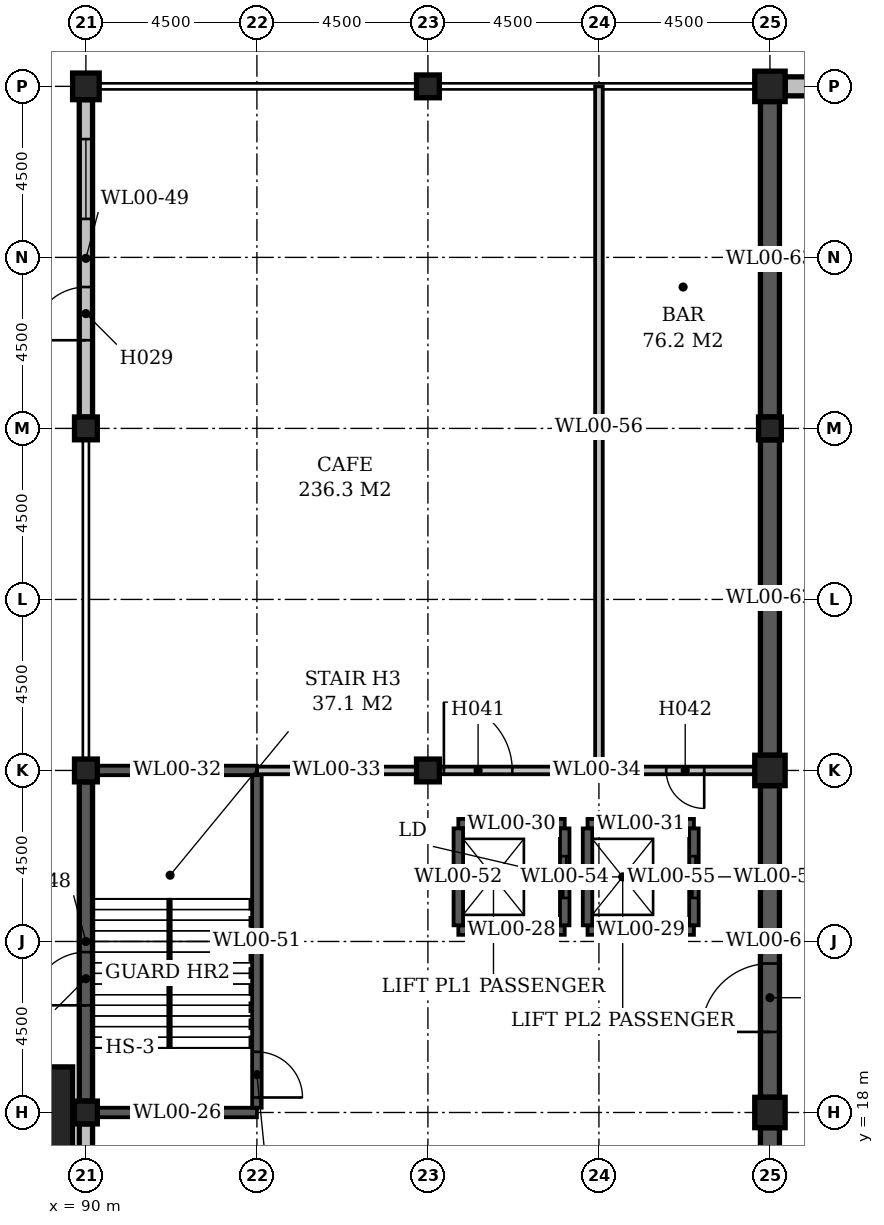
"""IFC4 building model, lengths in metres.
Left out: names, types, materials, properties, quantities, classifications, styles, units other than length and angle.
Written with IfcOpenShell. Run it as: python <this file> out.ifc"""

import sys

from ifc_helpers import new_model, si_unit, direction, frame, frame_2d, origin, origin_2d, place, context, subcontext, project, spatial, rectangle, extrude, element, fill, save


model = new_model("IFC4")
c1 = context("Model", 3, precision=1e-05, world=origin(), true_north=direction((0.0, 1.0)))
c2 = subcontext(c1, "Body", "Model", "MODEL_VIEW")
j1 = project(units=[si_unit("LENGTHUNIT", "METRE"), si_unit("PLANEANGLEUNIT", "RADIAN")], contexts=[c1])
p1 = place(None, origin())
s1 = spatial("IfcSite", under=j1, at=p1, CompositionType="ELEMENT")
p2 = place(p1, origin())
s2 = spatial("IfcBuilding", under=s1, at=p2, CompositionType="ELEMENT")
p3 = place(p2, origin())
s3 = spatial("IfcBuildingStorey", under=s2, at=p3, CompositionType="ELEMENT", Elevation=0.0)
for number, where, z_axis, x_axis in (
    (1, (90.0, 18.0, 0.0), (0.0, 0.0, 1.0), (1.0, 0.0, 0.0)),
    (2, (90.0, 27.0, 0.0), (0.0, 0.0, 1.0), (1.0, 0.0, 0.0)),
    (3, (90.0, 36.0, 0.0), (0.0, 0.0, 1.0), (1.0, 0.0, 0.0)),
):
    element("IfcColumn", number, at=place(p3, frame(where, z_axis=z_axis, x_axis=x_axis)), inside=s3, PredefinedType="COLUMN", context=c2, shape_type="SweptSolid", body=[
        extrude(rectangle(XDim=0.6, YDim=0.6, at=origin_2d()), origin(), (0.0, 0.0, 1.0), 8.7),
    ])
p4 = place(p3, frame((90.0, 45.0, 0.0), z_axis=(0.0, 0.0, 1.0), x_axis=(1.0, 0.0, 0.0)))
e4 = element("IfcColumn", 4, at=p4, inside=s3, PredefinedType="COLUMN", context=c2, shape_type="SweptSolid", body=[
    extrude(rectangle(XDim=0.7, YDim=0.7, at=origin_2d()), origin(), (0.0, 0.0, 1.0), 8.7),
])
for number, where, z_axis, x_axis in (
    (5, (99.0, 27.0, 0.0), (0.0, 0.0, 1.0), (1.0, 0.0, 0.0)),
    (6, (99.0, 45.0, 0.0), (0.0, 0.0, 1.0), (1.0, 0.0, 0.0)),
):
    element("IfcColumn", number, at=place(p3, frame(where, z_axis=z_axis, x_axis=x_axis)), inside=s3, PredefinedType="COLUMN", context=c2, shape_type="SweptSolid", body=[
        extrude(rectangle(XDim=0.6, YDim=0.6, at=origin_2d()), origin(), (0.0, 0.0, 1.0), 8.7),
    ])
for number, where, z_axis, x_axis in (
    (7, (108.0, 18.0, -0.3), (0.0, 0.0, 1.0), (1.0, 0.0, 0.0)),
    (8, (108.0, 27.0, -0.3), (0.0, 0.0, 1.0), (1.0, 0.0, 0.0)),
):
    element("IfcColumn", number, at=place(p3, frame(where, z_axis=z_axis, x_axis=x_axis)), inside=s3, PredefinedType="COLUMN", context=c2, shape_type="SweptSolid", body=[
        extrude(rectangle(XDim=0.8, YDim=0.8, at=origin_2d()), origin(), (0.0, 0.0, 1.0), 9.0),
    ])
p5 = place(p3, frame((108.0, 36.0, -0.3), z_axis=(0.0, 0.0, 1.0), x_axis=(1.0, 0.0, 0.0)))
e9 = element("IfcColumn", 9, at=p5, inside=s3, PredefinedType="COLUMN", context=c2, shape_type="SweptSolid", body=[
    extrude(rectangle(XDim=0.6, YDim=0.6, at=origin_2d()), origin(), (0.0, 0.0, 1.0), 9.0),
])
p6 = place(p3, frame((108.0, 45.0, -0.3), z_axis=(0.0, 0.0, 1.0), x_axis=(1.0, 0.0, 0.0)))
e10 = element("IfcColumn", 10, at=p6, inside=s3, PredefinedType="COLUMN", context=c2, shape_type="SweptSolid", body=[
    extrude(rectangle(XDim=0.8, YDim=0.8, at=origin_2d()), origin(), (0.0, 0.0, 1.0), 9.0),
])
p7 = place(p3, frame((90.3, 18.0, 0.0), z_axis=(0.0, 0.0, 1.0), x_axis=(1.0, 0.0, 0.0)))
e11 = element("IfcWall", 11, at=p7, inside=s3, PredefinedType="STANDARD", context=c2, shape_type="SweptSolid", body=[
    extrude(rectangle(XDim=4.2, YDim=0.25, at=frame_2d((2.1, 0.0))), origin(), (0.0, 0.0, 1.0), 9.0),
])
for number, where, z_axis, x_axis in (
    (12, (99.8, 22.8, 0.0), (0.0, 0.0, 1.0), (1.0, 0.0, 0.0)),
    (13, (103.2, 22.8, 0.0), (0.0, 0.0, 1.0), (1.0, 0.0, 0.0)),
    (14, (99.8, 25.6, 0.0), (0.0, 0.0, 1.0), (1.0, 0.0, 0.0)),
    (15, (103.2, 25.6, 0.0), (0.0, 0.0, 1.0), (1.0, 0.0, 0.0)),
):
    element("IfcWall", number, at=place(p3, frame(where, z_axis=z_axis, x_axis=x_axis)), inside=s3, PredefinedType="STANDARD", context=c2, shape_type="SweptSolid", body=[
        extrude(rectangle(XDim=2.8, YDim=0.25, at=frame_2d((1.4, 0.0))), origin(), (0.0, 0.0, 1.0), 9.0),
    ])
p8 = place(p3, frame((90.3, 27.0, 0.0), z_axis=(0.0, 0.0, 1.0), x_axis=(1.0, 0.0, 0.0)))
e16 = element("IfcWall", 16, at=p8, inside=s3, PredefinedType="STANDARD", context=c2, shape_type="SweptSolid", body=[
    extrude(rectangle(XDim=4.2, YDim=0.25, at=frame_2d((2.1, 0.0))), origin(), (0.0, 0.0, 1.0), 9.0),
])
p9 = place(p3, frame((94.5, 27.0, 0.0), z_axis=(0.0, 0.0, 1.0), x_axis=(1.0, 0.0, 0.0)))
e17 = element("IfcWall", 17, at=p9, inside=s3, PredefinedType="STANDARD", context=c2, shape_type="SweptSolid", body=[
    extrude(rectangle(XDim=4.2, YDim=0.2, at=frame_2d((2.1, 0.0))), origin(), (0.0, 0.0, 1.0), 8.7),
])
p10 = place(p3, frame((99.3, 27.0, 0.0), z_axis=(0.0, 0.0, 1.0), x_axis=(1.0, 0.0, 0.0)))
e18 = element("IfcWall", 18, at=p10, inside=s3, PredefinedType="STANDARD", context=c2, shape_type="SweptSolid", body=[
    extrude(rectangle(XDim=8.3, YDim=0.2, at=frame_2d((4.15, 0.0))), origin(), (0.0, 0.0, 1.0), 8.7),
])
p11 = place(p10, frame((0.12, 0.0, 0.0)))
e19 = element("IfcOpeningElement", 19, at=p11, cuts=e18, PredefinedType="OPENING", context=c2, shape_type="SweptSolid", body=[
    extrude(rectangle(XDim=1.8, YDim=2.4, at=frame_2d((0.9, 1.2))), frame((0.0, 0.112, 0.0), z_axis=(0.0, -1.0, 0.0), x_axis=(1.0, 0.0, 0.0)), (0.0, 0.0, 1.0), 0.224),
])
p12 = place(p10, frame((5.97, 0.0, 0.0)))
e20 = element("IfcOpeningElement", 20, at=p12, cuts=e18, PredefinedType="OPENING", context=c2, shape_type="SweptSolid", body=[
    extrude(rectangle(XDim=1.0, YDim=2.1, at=frame_2d((0.5, 1.05))), frame((0.0, 0.112, 0.0), z_axis=(0.0, -1.0, 0.0), x_axis=(1.0, 0.0, 0.0)), (0.0, 0.0, 1.0), 0.224),
])
p13 = place(p3, frame((108.4, 45.0, 0.0), z_axis=(0.0, 0.0, 1.0), x_axis=(1.0, 0.0, 0.0)))
e21 = element("IfcWall", 21, at=p13, inside=s3, PredefinedType="STANDARD", context=c2, shape_type="SweptSolid", body=[
    extrude(rectangle(XDim=8.3, YDim=0.5, at=frame_2d((4.15, 0.0))), origin(), (0.0, 0.0, 1.0), 9.0),
])
p14 = place(p3, frame((90.0, 9.3, 0.0), z_axis=(0.0, 0.0, 1.0), x_axis=(0.0, 1.0, 0.0)))
e22 = element("IfcWall", 22, at=p14, inside=s3, PredefinedType="STANDARD", context=c2, shape_type="SweptSolid", body=[
    extrude(rectangle(XDim=8.4, YDim=0.35, at=frame_2d((4.2, 0.0))), origin(), (0.0, 0.0, 1.0), 8.1),
])
p15 = place(p14, frame((1.2, 0.0, 0.0)))
e23 = element("IfcOpeningElement", 23, at=p15, cuts=e22, PredefinedType="OPENING", context=c2, shape_type="SweptSolid", body=[
    extrude(rectangle(XDim=1.8, YDim=2.4, at=frame_2d((0.9, 1.2))), frame((0.0, 0.187, 0.0), z_axis=(0.0, -1.0, 0.0), x_axis=(1.0, 0.0, 0.0)), (0.0, 0.0, 1.0), 0.374),
])
p16 = place(p14, frame((3.3, 0.0, 0.0)))
e24 = element("IfcOpeningElement", 24, at=p16, cuts=e22, PredefinedType="OPENING", context=c2, shape_type="SweptSolid", body=[
    extrude(rectangle(XDim=1.8, YDim=2.4, at=frame_2d((0.9, 1.2))), frame((0.0, 0.187, 0.0), z_axis=(0.0, -1.0, 0.0), x_axis=(1.0, 0.0, 0.0)), (0.0, 0.0, 1.0), 0.374),
])
p17 = place(p14, frame((5.4, 0.0, 0.0)))
e25 = element("IfcOpeningElement", 25, at=p17, cuts=e22, PredefinedType="OPENING", context=c2, shape_type="SweptSolid", body=[
    extrude(rectangle(XDim=1.8, YDim=2.4, at=frame_2d((0.9, 1.2))), frame((0.0, 0.187, 0.0), z_axis=(0.0, -1.0, 0.0), x_axis=(1.0, 0.0, 0.0)), (0.0, 0.0, 1.0), 0.374),
])
p18 = place(p3, frame((90.0, 18.3, 0.0), z_axis=(0.0, 0.0, 1.0), x_axis=(0.0, 1.0, 0.0)))
e26 = element("IfcWall", 26, at=p18, inside=s3, PredefinedType="STANDARD", context=c2, shape_type="SweptSolid", body=[
    extrude(rectangle(XDim=8.4, YDim=0.35, at=frame_2d((4.2, 0.0))), origin(), (0.0, 0.0, 1.0), 9.0),
])
p19 = place(p18, frame((2.52, 0.0, 0.0)))
e27 = element("IfcOpeningElement", 27, at=p19, cuts=e26, PredefinedType="OPENING", context=c2, shape_type="SweptSolid", body=[
    extrude(rectangle(XDim=1.4, YDim=2.1, at=frame_2d((0.7, 1.05))), frame((0.0, 0.187, 0.0), z_axis=(0.0, -1.0, 0.0), x_axis=(1.0, 0.0, 0.0)), (0.0, 0.0, 1.0), 0.374),
])
p20 = place(p3, frame((90.0, 36.3, 0.0), z_axis=(0.0, 0.0, 1.0), x_axis=(0.0, 1.0, 0.0)))
e28 = element("IfcWall", 28, at=p20, inside=s3, PredefinedType="STANDARD", context=c2, shape_type="SweptSolid", body=[
    extrude(rectangle(XDim=8.35, YDim=0.35, at=frame_2d((4.175, 0.0))), origin(), (0.0, 0.0, 1.0), 8.1),
])
p21 = place(p20, frame((2.02, 0.0, 0.0)))
e29 = element("IfcOpeningElement", 29, at=p21, cuts=e28, PredefinedType="OPENING", context=c2, shape_type="SweptSolid", body=[
    extrude(rectangle(XDim=1.4, YDim=2.1, at=frame_2d((0.7, 1.05))), frame((0.0, 0.187, 0.0), z_axis=(0.0, -1.0, 0.0), x_axis=(1.0, 0.0, 0.0)), (0.0, 0.0, 1.0), 0.374),
])
p22 = place(p20, frame((5.212, 0.0, 1.2)))
e30 = element("IfcOpeningElement", 30, at=p22, cuts=e28, PredefinedType="OPENING", context=c2, shape_type="SweptSolid", body=[
    extrude(rectangle(XDim=2.1, YDim=2.4, at=frame_2d((1.05, 1.2))), frame((0.0, 0.187, 0.0), z_axis=(0.0, -1.0, 0.0), x_axis=(1.0, 0.0, 0.0)), (0.0, 0.0, 1.0), 0.374),
])
p23 = place(p3, frame((94.5, 18.125, 0.0), z_axis=(0.0, 0.0, 1.0), x_axis=(0.0, 1.0, 0.0)))
e31 = element("IfcWall", 31, at=p23, inside=s3, PredefinedType="STANDARD", context=c2, shape_type="SweptSolid", body=[
    extrude(rectangle(XDim=8.75, YDim=0.25, at=frame_2d((4.375, 0.0))), origin(), (0.0, 0.0, 1.0), 9.0),
])
p24 = place(p23, frame((0.27, 0.0, 0.0)))
e32 = element("IfcOpeningElement", 32, at=p24, cuts=e31, PredefinedType="OPENING", context=c2, shape_type="SweptSolid", body=[
    extrude(rectangle(XDim=1.2, YDim=2.1, at=frame_2d((0.6, 1.05))), frame((0.0, 0.137, 0.0), z_axis=(0.0, -1.0, 0.0), x_axis=(1.0, 0.0, 0.0)), (0.0, 0.0, 1.0), 0.274),
])
p25 = place(p3, frame((99.8, 22.925, 0.0), z_axis=(0.0, 0.0, 1.0), x_axis=(0.0, 1.0, 0.0)))
e33 = element("IfcWall", 33, at=p25, inside=s3, PredefinedType="STANDARD", context=c2, shape_type="SweptSolid", body=[
    extrude(rectangle(XDim=2.55, YDim=0.25, at=frame_2d((1.275, 0.0))), origin(), (0.0, 0.0, 1.0), 9.0),
])
p26 = place(p3, frame((102.6, 22.925, 0.0), z_axis=(0.0, 0.0, 1.0), x_axis=(0.0, 1.0, 0.0)))
e34 = element("IfcWall", 34, at=p26, inside=s3, PredefinedType="STANDARD", context=c2, shape_type="SweptSolid", body=[
    extrude(rectangle(XDim=2.55, YDim=0.25, at=frame_2d((1.275, 0.0))), origin(), (0.0, 0.0, 1.0), 9.0),
])
p27 = place(p26, frame((0.72, 0.0, 0.0)))
e35 = element("IfcOpeningElement", 35, at=p27, cuts=e34, PredefinedType="OPENING", context=c2, shape_type="SweptSolid", body=[
    extrude(rectangle(XDim=1.1, YDim=2.1, at=frame_2d((0.55, 1.05))), frame((0.0, 0.137, 0.0), z_axis=(0.0, -1.0, 0.0), x_axis=(1.0, 0.0, 0.0)), (0.0, 0.0, 1.0), 0.274),
])
p28 = place(p3, frame((103.2, 22.925, 0.0), z_axis=(0.0, 0.0, 1.0), x_axis=(0.0, 1.0, 0.0)))
e36 = element("IfcWall", 36, at=p28, inside=s3, PredefinedType="STANDARD", context=c2, shape_type="SweptSolid", body=[
    extrude(rectangle(XDim=2.55, YDim=0.25, at=frame_2d((1.275, 0.0))), origin(), (0.0, 0.0, 1.0), 9.0),
])
p29 = place(p3, frame((103.5, 27.1, 0.0), z_axis=(0.0, 0.0, 1.0), x_axis=(0.0, 1.0, 0.0)))
e37 = element("IfcWall", 37, at=p29, inside=s3, PredefinedType="STANDARD", context=c2, shape_type="SweptSolid", body=[
    extrude(rectangle(XDim=17.9, YDim=0.2, at=frame_2d((8.95, 0.0))), origin(), (0.0, 0.0, 1.0), 8.7),
])
p30 = place(p3, frame((106.0, 22.925, 0.0), z_axis=(0.0, 0.0, 1.0), x_axis=(0.0, 1.0, 0.0)))
e38 = element("IfcWall", 38, at=p30, inside=s3, PredefinedType="STANDARD", context=c2, shape_type="SweptSolid", body=[
    extrude(rectangle(XDim=2.55, YDim=0.25, at=frame_2d((1.275, 0.0))), origin(), (0.0, 0.0, 1.0), 9.0),
])
p31 = place(p30, frame((0.72, 0.0, 0.0)))
e39 = element("IfcOpeningElement", 39, at=p31, cuts=e38, PredefinedType="OPENING", context=c2, shape_type="SweptSolid", body=[
    extrude(rectangle(XDim=1.1, YDim=2.1, at=frame_2d((0.55, 1.05))), frame((0.0, 0.137, 0.0), z_axis=(0.0, -1.0, 0.0), x_axis=(1.0, 0.0, 0.0)), (0.0, 0.0, 1.0), 0.274),
])
p32 = place(p3, frame((108.0, 9.4, 0.0), z_axis=(0.0, 0.0, 1.0), x_axis=(0.0, 1.0, 0.0)))
e40 = element("IfcWall", 40, at=p32, inside=s3, PredefinedType="STANDARD", context=c2, shape_type="SweptSolid", body=[
    extrude(rectangle(XDim=8.2, YDim=0.5, at=frame_2d((4.1, 0.0))), origin(), (0.0, 0.0, 1.0), 9.0),
])
p33 = place(p3, frame((108.0, 18.4, 0.0), z_axis=(0.0, 0.0, 1.0), x_axis=(0.0, 1.0, 0.0)))
e41 = element("IfcWall", 41, at=p33, inside=s3, PredefinedType="STANDARD", context=c2, shape_type="SweptSolid", body=[
    extrude(rectangle(XDim=8.2, YDim=0.5, at=frame_2d((4.1, 0.0))), origin(), (0.0, 0.0, 1.0), 9.0),
])
p34 = place(p33, frame((1.72, 0.0, 0.0)))
e42 = element("IfcOpeningElement", 42, at=p34, cuts=e41, PredefinedType="OPENING", context=c2, shape_type="SweptSolid", body=[
    extrude(rectangle(XDim=1.8, YDim=2.4, at=frame_2d((0.9, 1.2))), frame((0.0, 0.262, 0.0), z_axis=(0.0, -1.0, 0.0), x_axis=(1.0, 0.0, 0.0)), (0.0, 0.0, 1.0), 0.524),
])
for number, where, z_axis, x_axis in (
    (43, (108.0, 27.4, 0.0), (0.0, 0.0, 1.0), (0.0, 1.0, 0.0)),
    (44, (108.0, 36.3, 0.0), (0.0, 0.0, 1.0), (0.0, 1.0, 0.0)),
):
    element("IfcWall", number, at=place(p3, frame(where, z_axis=z_axis, x_axis=x_axis)), inside=s3, PredefinedType="STANDARD", context=c2, shape_type="SweptSolid", body=[
        extrude(rectangle(XDim=8.3, YDim=0.5, at=frame_2d((4.15, 0.0))), origin(), (0.0, 0.0, 1.0), 9.0),
    ])
p35 = place(p3, frame((88.85, 18.0, 0.0), z_axis=(0.0, 0.0, 1.0), x_axis=(1.0, 0.0, 0.0)))
e45 = element("IfcColumn", 45, at=p35, inside=s3, PredefinedType="COLUMN", context=c2, shape_type="SweptSolid", body=[
    extrude(rectangle(XDim=1.6, YDim=2.4, at=origin_2d()), origin(), (0.0, 0.0, 1.0), 9.0),
])
p36 = place(p34, origin())
e46 = element("IfcDoor", 46, at=p36, inside=s3, OperationType="DOUBLE_DOOR_SINGLE_SWING", PredefinedType="DOOR", context=c2, shape_type="SweptSolid", body=[
    extrude(rectangle(XDim=1.8, YDim=2.4, at=frame_2d((0.9, 1.2))), frame((0.0, 0.025, 0.0), z_axis=(0.0, -1.0, 0.0), x_axis=(1.0, 0.0, 0.0)), (0.0, 0.0, 1.0), 0.05),
])
fill(e42, e46)
p37 = place(p21, origin())
e47 = element("IfcDoor", 47, at=p37, inside=s3, OperationType="DOUBLE_DOOR_SINGLE_SWING", PredefinedType="DOOR", context=c2, shape_type="SweptSolid", body=[
    extrude(rectangle(XDim=1.4, YDim=2.1, at=frame_2d((0.7, 1.05))), frame((0.0, 0.025, 0.0), z_axis=(0.0, -1.0, 0.0), x_axis=(1.0, 0.0, 0.0)), (0.0, 0.0, 1.0), 0.05),
])
fill(e29, e47)
p38 = place(p19, origin())
e48 = element("IfcDoor", 48, at=p38, inside=s3, OperationType="DOUBLE_DOOR_SINGLE_SWING", PredefinedType="DOOR", context=c2, shape_type="SweptSolid", body=[
    extrude(rectangle(XDim=1.4, YDim=2.1, at=frame_2d((0.7, 1.05))), frame((0.0, 0.025, 0.0), z_axis=(0.0, -1.0, 0.0), x_axis=(1.0, 0.0, 0.0)), (0.0, 0.0, 1.0), 0.05),
])
fill(e27, e48)
p39 = place(p24, frame((1.2, 0.0, 0.0), z_axis=(0.0, 0.0, 1.0), x_axis=(-1.0, 0.0, 0.0)))
e49 = element("IfcDoor", 49, at=p39, inside=s3, OperationType="SINGLE_SWING_RIGHT", PredefinedType="DOOR", context=c2, shape_type="SweptSolid", body=[
    extrude(rectangle(XDim=1.2, YDim=2.1, at=frame_2d((0.6, 1.05))), frame((0.0, 0.025, 0.0), z_axis=(0.0, -1.0, 0.0), x_axis=(1.0, 0.0, 0.0)), (0.0, 0.0, 1.0), 0.05),
])
fill(e32, e49)
p40 = place(p11, origin())
e50 = element("IfcDoor", 50, at=p40, inside=s3, OperationType="DOUBLE_DOOR_SINGLE_SWING", PredefinedType="DOOR", context=c2, shape_type="SweptSolid", body=[
    extrude(rectangle(XDim=1.8, YDim=2.4, at=frame_2d((0.9, 1.2))), frame((0.0, 0.025, 0.0), z_axis=(0.0, -1.0, 0.0), x_axis=(1.0, 0.0, 0.0)), (0.0, 0.0, 1.0), 0.05),
])
fill(e19, e50)
p41 = place(p12, origin())
e51 = element("IfcDoor", 51, at=p41, inside=s3, OperationType="SINGLE_SWING_RIGHT", PredefinedType="DOOR", context=c2, shape_type="SweptSolid", body=[
    extrude(rectangle(XDim=1.0, YDim=2.1, at=frame_2d((0.5, 1.05))), frame((0.0, 0.025, 0.0), z_axis=(0.0, -1.0, 0.0), x_axis=(1.0, 0.0, 0.0)), (0.0, 0.0, 1.0), 0.05),
])
fill(e20, e51)
p42 = place(p27, origin())
e52 = element("IfcDoor", 52, at=p42, inside=s3, OperationType="SLIDING_TO_LEFT", PredefinedType="DOOR", context=c2, shape_type="SweptSolid", body=[
    extrude(rectangle(XDim=1.1, YDim=2.1, at=frame_2d((0.55, 1.05))), frame((0.0, 0.025, 0.0), z_axis=(0.0, -1.0, 0.0), x_axis=(1.0, 0.0, 0.0)), (0.0, 0.0, 1.0), 0.05),
])
fill(e35, e52)
p43 = place(p31, origin())
e53 = element("IfcDoor", 53, at=p43, inside=s3, OperationType="SLIDING_TO_LEFT", PredefinedType="DOOR", context=c2, shape_type="SweptSolid", body=[
    extrude(rectangle(XDim=1.1, YDim=2.1, at=frame_2d((0.55, 1.05))), frame((0.0, 0.025, 0.0), z_axis=(0.0, -1.0, 0.0), x_axis=(1.0, 0.0, 0.0)), (0.0, 0.0, 1.0), 0.05),
])
fill(e39, e53)
p44 = place(p22, origin())
e54 = element("IfcWindow", 54, at=p44, inside=s3, PartitioningType="SINGLE_PANEL", PredefinedType="WINDOW", context=c2, shape_type="SweptSolid", body=[
    extrude(rectangle(XDim=2.1, YDim=2.4, at=frame_2d((1.05, 1.2))), frame((0.0, 0.03, 0.0), z_axis=(0.0, -1.0, 0.0), x_axis=(1.0, 0.0, 0.0)), (0.0, 0.0, 1.0), 0.06),
])
fill(e30, e54)
save(model, sys.argv[1])
